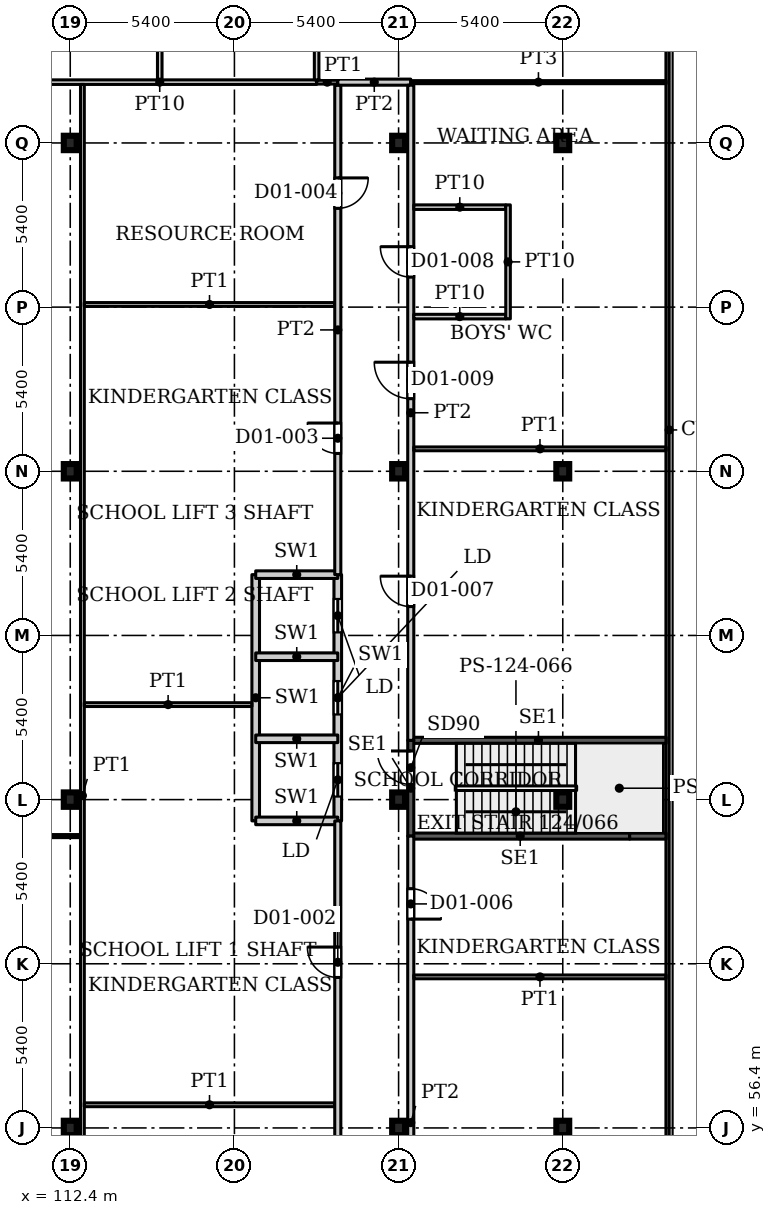
"""IFC4 building model, lengths in metres.
Left out: names, types, materials, properties, quantities, classifications, styles, units other than length and angle.
Written with IfcOpenShell. Run it as: python <this file> out.ifc"""

import sys

from ifc_helpers import new_model, si_unit, direction, frame, frame_2d, origin, origin_2d, place, context, subcontext, project, spatial, rectangle, i_section, extrude, source, transform, mapped, element, fill, save


model = new_model("IFC4")
c1 = context("Model", 3, precision=1e-05, world=origin(), true_north=direction((0.0, 1.0)))
c2 = subcontext(c1, "Body", "Model", "MODEL_VIEW")
j1 = project(units=[si_unit("LENGTHUNIT", "METRE"), si_unit("PLANEANGLEUNIT", "RADIAN")], contexts=[c1])
p1 = place(None, origin())
s1 = spatial("IfcSite", under=j1, at=p1, CompositionType="ELEMENT")
p2 = place(p1, origin())
s2 = spatial("IfcBuilding", under=s1, at=p2, CompositionType="ELEMENT")
p3 = place(p2, frame((0.0, 0.0, 7.5)))
s3 = spatial("IfcBuildingStorey", under=s2, at=p3, CompositionType="ELEMENT", Elevation=7.5)
for number, where, z_axis, x_axis in (
    (1, (112.4, 56.4, 0.0), (0.0, 0.0, 1.0), (1.0, 0.0, 0.0)),
    (2, (123.2, 56.4, 0.0), (0.0, 0.0, 1.0), (1.0, 0.0, 0.0)),
    (3, (128.6, 56.4, 0.0), (0.0, 0.0, 1.0), (1.0, 0.0, 0.0)),
    (4, (112.4, 67.2, 0.0), (0.0, 0.0, 1.0), (1.0, 0.0, 0.0)),
    (5, (123.2, 67.2, 0.0), (0.0, 0.0, 1.0), (1.0, 0.0, 0.0)),
    (6, (128.6, 67.2, 0.0), (0.0, 0.0, 1.0), (1.0, 0.0, 0.0)),
    (7, (112.4, 78.0, 0.0), (0.0, 0.0, 1.0), (1.0, 0.0, 0.0)),
    (8, (123.2, 78.0, 0.0), (0.0, 0.0, 1.0), (1.0, 0.0, 0.0)),
    (9, (128.6, 78.0, 0.0), (0.0, 0.0, 1.0), (1.0, 0.0, 0.0)),
    (10, (112.4, 88.8, 0.0), (0.0, 0.0, 1.0), (1.0, 0.0, 0.0)),
    (11, (123.2, 88.8, 0.0), (0.0, 0.0, 1.0), (1.0, 0.0, 0.0)),
    (12, (128.6, 88.8, 0.0), (0.0, 0.0, 1.0), (1.0, 0.0, 0.0)),
):
    element("IfcColumn", number, at=place(p3, frame(where, z_axis=z_axis, x_axis=x_axis)), inside=s3, PredefinedType="COLUMN", context=c2, shape_type="SweptSolid", body=[
        extrude(i_section(OverallWidth=0.424, OverallDepth=0.474, WebThickness=0.048, FlangeThickness=0.077, FilletRadius=0.014, at=origin_2d()), origin(), (0.0, 0.0, 1.0), 5.0),
    ])
p4 = place(p3, frame((118.5, 66.5, 0.0), z_axis=(0.0, 0.0, 1.0), x_axis=(0.0, 1.0, 0.0)))
e13 = element("IfcWall", 13, at=p4, inside=s3, PredefinedType="PARTITIONING", context=c2, shape_type="SweptSolid", body=[
    extrude(rectangle(XDim=8.1, YDim=0.25, at=frame_2d((4.05, 0.0))), origin(), (0.0, 0.0, 1.0), 5.0),
])
p5 = place(p3, frame((121.2, 66.5, 0.0), z_axis=(0.0, 0.0, 1.0), x_axis=(0.0, 1.0, 0.0)))
e14 = element("IfcWall", 14, at=p5, inside=s3, PredefinedType="PARTITIONING", context=c2, shape_type="SweptSolid", body=[
    extrude(rectangle(XDim=8.1, YDim=0.25, at=frame_2d((4.05, 0.0))), origin(), (0.0, 0.0, 1.0), 5.0),
])
p6 = place(p5, frame((0.8, 0.0, 0.0)))
e15 = element("IfcOpeningElement", 15, at=p6, cuts=e14, PredefinedType="OPENING", context=c2, shape_type="SweptSolid", body=[
    extrude(rectangle(XDim=1.1, YDim=2.2, at=frame_2d((0.55, 1.1))), frame((0.0, 0.135, 0.0), z_axis=(0.0, -1.0, 0.0), x_axis=(1.0, 0.0, 0.0)), (0.0, 0.0, 1.0), 0.27),
])
p7 = place(p5, frame((3.5, 0.0, 0.0)))
e16 = element("IfcOpeningElement", 16, at=p7, cuts=e14, PredefinedType="OPENING", context=c2, shape_type="SweptSolid", body=[
    extrude(rectangle(XDim=1.1, YDim=2.2, at=frame_2d((0.55, 1.1))), frame((0.0, 0.135, 0.0), z_axis=(0.0, -1.0, 0.0), x_axis=(1.0, 0.0, 0.0)), (0.0, 0.0, 1.0), 0.27),
])
p8 = place(p5, frame((6.2, 0.0, 0.0)))
e17 = element("IfcOpeningElement", 17, at=p8, cuts=e14, PredefinedType="OPENING", context=c2, shape_type="SweptSolid", body=[
    extrude(rectangle(XDim=1.1, YDim=2.2, at=frame_2d((0.55, 1.1))), frame((0.0, 0.135, 0.0), z_axis=(0.0, -1.0, 0.0), x_axis=(1.0, 0.0, 0.0)), (0.0, 0.0, 1.0), 0.27),
])
for number, where, z_axis, x_axis in (
    (18, (118.5, 66.5, 0.0), (0.0, 0.0, 1.0), (1.0, 0.0, 0.0)),
    (19, (118.5, 69.2, 0.0), (0.0, 0.0, 1.0), (1.0, 0.0, 0.0)),
    (20, (118.5, 71.9, 0.0), (0.0, 0.0, 1.0), (1.0, 0.0, 0.0)),
    (21, (118.5, 74.6, 0.0), (0.0, 0.0, 1.0), (1.0, 0.0, 0.0)),
):
    element("IfcWall", number, at=place(p3, frame(where, z_axis=z_axis, x_axis=x_axis)), inside=s3, PredefinedType="PARTITIONING", context=c2, shape_type="SweptSolid", body=[
        extrude(rectangle(XDim=2.7, YDim=0.25, at=frame_2d((1.35, 0.0))), origin(), (0.0, 0.0, 1.0), 5.0),
    ])
p9 = place(p3, frame((123.6, 66.0, 0.0), z_axis=(0.0, 0.0, 1.0), x_axis=(1.0, 0.0, 0.0)))
e22 = element("IfcWall", 22, at=p9, inside=s3, PredefinedType="SHEAR", context=c2, shape_type="SweptSolid", body=[
    extrude(rectangle(XDim=7.2, YDim=0.2, at=frame_2d((3.6, 0.0))), origin(), (0.0, 0.0, 1.0), 5.0),
])
p10 = place(p3, frame((130.8, 66.0, 0.0), z_axis=(0.0, 0.0, 1.0), x_axis=(1.0, 0.0, 0.0)))
e23 = element("IfcWall", 23, at=p10, inside=s3, PredefinedType="SHEAR", context=c2, shape_type="SweptSolid", body=[
    extrude(rectangle(XDim=1.2, YDim=0.2, at=frame_2d((0.6, 0.0))), origin(), (0.0, 0.0, 1.0), 5.0),
])
p11 = place(p3, frame((123.6, 69.15, 0.0), z_axis=(0.0, 0.0, 1.0), x_axis=(1.0, 0.0, 0.0)))
e24 = element("IfcWall", 24, at=p11, inside=s3, PredefinedType="SHEAR", context=c2, shape_type="SweptSolid", body=[
    extrude(rectangle(XDim=8.4, YDim=0.2, at=frame_2d((4.2, 0.0))), origin(), (0.0, 0.0, 1.0), 5.0),
])
p12 = place(p3, frame((123.6, 66.0, 0.0), z_axis=(0.0, 0.0, 1.0), x_axis=(0.0, 1.0, 0.0)))
e25 = element("IfcWall", 25, at=p12, inside=s3, PredefinedType="SHEAR", context=c2, shape_type="SweptSolid", body=[
    extrude(rectangle(XDim=3.15, YDim=0.2, at=frame_2d((1.575, 0.0))), origin(), (0.0, 0.0, 1.0), 5.0),
])
p13 = place(p12, frame((1.7, 0.0, 0.0)))
e26 = element("IfcOpeningElement", 26, at=p13, cuts=e25, PredefinedType="OPENING", context=c2, shape_type="SweptSolid", body=[
    extrude(rectangle(XDim=1.1, YDim=2.2, at=frame_2d((0.55, 1.1))), frame((0.0, 0.11, 0.0), z_axis=(0.0, -1.0, 0.0), x_axis=(1.0, 0.0, 0.0)), (0.0, 0.0, 1.0), 0.22),
])
p14 = place(p3, frame((92.7, 66.0, 0.0), z_axis=(0.0, 0.0, 1.0), x_axis=(1.0, 0.0, 0.0)))
e27 = element("IfcWall", 27, at=p14, inside=s3, PredefinedType="PARTITIONING", context=c2, shape_type="SweptSolid", body=[
    extrude(rectangle(XDim=20.038, YDim=0.1, at=frame_2d((10.019, 0.0))), origin(), (0.0, 0.0, 1.0), 4.68),
])
p15 = place(p3, frame((110.183, 90.8, 0.0), z_axis=(0.0, 0.0, 1.0), x_axis=(1.0, 0.0, 0.0)))
e28 = element("IfcWall", 28, at=p15, inside=s3, PredefinedType="PARTITIONING", context=c2, shape_type="SweptSolid", body=[
    extrude(rectangle(XDim=10.321, YDim=0.15, at=frame_2d((5.16, 0.0))), origin(), (0.0, 0.0, 1.0), 4.68),
])
p16 = place(p3, frame((112.8, 43.938, 0.0), z_axis=(0.0, 0.0, 1.0), x_axis=(0.0, 1.0, 0.0)))
e29 = element("IfcWall", 29, at=p16, inside=s3, PredefinedType="PARTITIONING", context=c2, shape_type="SweptSolid", body=[
    extrude(rectangle(XDim=46.787, YDim=0.125, at=frame_2d((23.394, 0.0))), origin(), (0.0, 0.0, 1.0), 4.68),
])
p17 = place(p3, frame((112.862, 57.162, 0.0), z_axis=(0.0, 0.0, 1.0), x_axis=(1.0, 0.0, 0.0)))
e30 = element("IfcWall", 30, at=p17, inside=s3, PredefinedType="PARTITIONING", context=c2, shape_type="SweptSolid", body=[
    extrude(rectangle(XDim=8.238, YDim=0.125, at=frame_2d((4.119, 0.0))), origin(), (0.0, 0.0, 1.0), 4.68),
])
p18 = place(p3, frame((112.862, 70.325, 0.0), z_axis=(0.0, 0.0, 1.0), x_axis=(1.0, 0.0, 0.0)))
e31 = element("IfcWall", 31, at=p18, inside=s3, PredefinedType="PARTITIONING", context=c2, shape_type="SweptSolid", body=[
    extrude(rectangle(XDim=5.514, YDim=0.125, at=frame_2d((2.757, 0.0))), origin(), (0.0, 0.0, 1.0), 4.68),
])
p19 = place(p3, frame((112.862, 83.487, 0.0), z_axis=(0.0, 0.0, 1.0), x_axis=(1.0, 0.0, 0.0)))
e32 = element("IfcWall", 32, at=p19, inside=s3, PredefinedType="PARTITIONING", context=c2, shape_type="SweptSolid", body=[
    extrude(rectangle(XDim=8.238, YDim=0.125, at=frame_2d((4.119, 0.0))), origin(), (0.0, 0.0, 1.0), 4.68),
])
p20 = place(p3, frame((115.344, 90.875, 0.0), z_axis=(0.0, 0.0, 1.0), x_axis=(0.0, 1.0, 0.0)))
e33 = element("IfcWall", 33, at=p20, inside=s3, PredefinedType="PARTITIONING", context=c2, shape_type="SweptSolid", body=[
    extrude(rectangle(XDim=8.225, YDim=0.15, at=frame_2d((4.113, 0.0))), origin(), (0.0, 0.0, 1.0), 4.68),
])
p21 = place(p3, frame((120.504, 90.8, 0.0), z_axis=(0.0, 0.0, 1.0), x_axis=(1.0, 0.0, 0.0)))
e34 = element("IfcWall", 34, at=p21, inside=s3, PredefinedType="PARTITIONING", context=c2, shape_type="SweptSolid", body=[
    extrude(rectangle(XDim=0.696, YDim=0.125, at=frame_2d((0.348, 0.0))), origin(), (0.0, 0.0, 1.0), 4.68),
])
p22 = place(p3, frame((120.504, 90.875, 0.0), z_axis=(0.0, 0.0, 1.0), x_axis=(0.0, 1.0, 0.0)))
e35 = element("IfcWall", 35, at=p22, inside=s3, PredefinedType="PARTITIONING", context=c2, shape_type="SweptSolid", body=[
    extrude(rectangle(XDim=8.225, YDim=0.15, at=frame_2d((4.113, 0.0))), origin(), (0.0, 0.0, 1.0), 4.68),
])
p23 = place(p3, frame((121.2, 43.9, 0.0), z_axis=(0.0, 0.0, 1.0), x_axis=(0.0, 1.0, 0.0)))
e36 = element("IfcWall", 36, at=p23, inside=s3, PredefinedType="PARTITIONING", context=c2, shape_type="SweptSolid", body=[
    extrude(rectangle(XDim=22.6, YDim=0.2, at=frame_2d((11.3, 0.0))), origin(), (0.0, 0.0, 1.0), 4.68),
])
p24 = place(p23, frame((6.112, 0.0, 0.0)))
e37 = element("IfcOpeningElement", 37, at=p24, cuts=e36, PredefinedType="OPENING", context=c2, shape_type="SweptSolid", body=[
    extrude(rectangle(XDim=1.0, YDim=2.1, at=frame_2d((0.5, 1.05))), frame((0.0, 0.11, 0.0), z_axis=(0.0, -1.0, 0.0), x_axis=(1.0, 0.0, 0.0)), (0.0, 0.0, 1.0), 0.22),
])
p25 = place(p23, frame((17.45, 0.0, 0.0)))
e38 = element("IfcOpeningElement", 38, at=p25, cuts=e36, PredefinedType="OPENING", context=c2, shape_type="SweptSolid", body=[
    extrude(rectangle(XDim=1.0, YDim=2.1, at=frame_2d((0.5, 1.05))), frame((0.0, 0.11, 0.0), z_axis=(0.0, -1.0, 0.0), x_axis=(1.0, 0.0, 0.0)), (0.0, 0.0, 1.0), 0.22),
])
p26 = place(p3, frame((121.2, 74.6, 0.0), z_axis=(0.0, 0.0, 1.0), x_axis=(0.0, 1.0, 0.0)))
e39 = element("IfcWall", 39, at=p26, inside=s3, PredefinedType="PARTITIONING", context=c2, shape_type="SweptSolid", body=[
    extrude(rectangle(XDim=16.1, YDim=0.2, at=frame_2d((8.05, 0.0))), origin(), (0.0, 0.0, 1.0), 4.68),
])
p27 = place(p26, frame((3.987, 0.0, 0.0)))
e40 = element("IfcOpeningElement", 40, at=p27, cuts=e39, PredefinedType="OPENING", context=c2, shape_type="SweptSolid", body=[
    extrude(rectangle(XDim=1.0, YDim=2.1, at=frame_2d((0.5, 1.05))), frame((0.0, 0.11, 0.0), z_axis=(0.0, -1.0, 0.0), x_axis=(1.0, 0.0, 0.0)), (0.0, 0.0, 1.0), 0.22),
])
p28 = place(p26, frame((12.05, 0.0, 0.0)))
e41 = element("IfcOpeningElement", 41, at=p28, cuts=e39, PredefinedType="OPENING", context=c2, shape_type="SweptSolid", body=[
    extrude(rectangle(XDim=1.0, YDim=2.1, at=frame_2d((0.5, 1.05))), frame((0.0, 0.11, 0.0), z_axis=(0.0, -1.0, 0.0), x_axis=(1.0, 0.0, 0.0)), (0.0, 0.0, 1.0), 0.22),
])
p29 = place(p3, frame((121.2, 90.8, 0.0), z_axis=(0.0, 0.0, 1.0), x_axis=(1.0, 0.0, 0.0)))
e42 = element("IfcWall", 42, at=p29, inside=s3, PredefinedType="PARTITIONING", context=c2, shape_type="SweptSolid", body=[
    extrude(rectangle(XDim=2.4, YDim=0.2, at=frame_2d((1.2, 0.0))), origin(), (0.0, 0.0, 1.0), 4.68),
])
p30 = place(p3, frame((123.6, 47.15, 0.0), z_axis=(0.0, 0.0, 1.0), x_axis=(0.0, 1.0, 0.0)))
e43 = element("IfcWall", 43, at=p30, inside=s3, PredefinedType="PARTITIONING", context=c2, shape_type="SweptSolid", body=[
    extrude(rectangle(XDim=18.85, YDim=0.2, at=frame_2d((9.425, 0.0))), origin(), (0.0, 0.0, 1.0), 4.68),
])
p31 = place(p30, frame((6.65, 0.0, 0.0)))
e44 = element("IfcOpeningElement", 44, at=p31, cuts=e43, PredefinedType="OPENING", context=c2, shape_type="SweptSolid", body=[
    extrude(rectangle(XDim=1.0, YDim=2.1, at=frame_2d((0.5, 1.05))), frame((0.0, 0.11, 0.0), z_axis=(0.0, -1.0, 0.0), x_axis=(1.0, 0.0, 0.0)), (0.0, 0.0, 1.0), 0.22),
])
p32 = place(p30, frame((16.119, 0.0, 0.0)))
e45 = element("IfcOpeningElement", 45, at=p32, cuts=e43, PredefinedType="OPENING", context=c2, shape_type="SweptSolid", body=[
    extrude(rectangle(XDim=1.0, YDim=2.1, at=frame_2d((0.5, 1.05))), frame((0.0, 0.11, 0.0), z_axis=(0.0, -1.0, 0.0), x_axis=(1.0, 0.0, 0.0)), (0.0, 0.0, 1.0), 0.22),
])
p33 = place(p3, frame((123.6, 69.15, 0.0), z_axis=(0.0, 0.0, 1.0), x_axis=(0.0, 1.0, 0.0)))
e46 = element("IfcWall", 46, at=p33, inside=s3, PredefinedType="PARTITIONING", context=c2, shape_type="SweptSolid", body=[
    extrude(rectangle(XDim=21.55, YDim=0.2, at=frame_2d((10.775, 0.0))), origin(), (0.0, 0.0, 1.0), 4.68),
])
p34 = place(p33, frame((4.4, 0.0, 0.0)))
e47 = element("IfcOpeningElement", 47, at=p34, cuts=e46, PredefinedType="OPENING", context=c2, shape_type="SweptSolid", body=[
    extrude(rectangle(XDim=1.0, YDim=2.1, at=frame_2d((0.5, 1.05))), frame((0.0, 0.11, 0.0), z_axis=(0.0, -1.0, 0.0), x_axis=(1.0, 0.0, 0.0)), (0.0, 0.0, 1.0), 0.22),
])
p35 = place(p33, frame((15.238, 0.0, 0.0)))
e48 = element("IfcOpeningElement", 48, at=p35, cuts=e46, PredefinedType="OPENING", context=c2, shape_type="SweptSolid", body=[
    extrude(rectangle(XDim=1.0, YDim=2.1, at=frame_2d((0.5, 1.05))), frame((0.0, 0.11, 0.0), z_axis=(0.0, -1.0, 0.0), x_axis=(1.0, 0.0, 0.0)), (0.0, 0.0, 1.0), 0.22),
])
p36 = place(p33, frame((11.238, 0.0, 0.0)))
e49 = element("IfcOpeningElement", 49, at=p36, cuts=e46, PredefinedType="OPENING", context=c2, shape_type="SweptSolid", body=[
    extrude(rectangle(XDim=1.2, YDim=2.1, at=frame_2d((0.6, 1.05))), frame((0.0, 0.11, 0.0), z_axis=(0.0, -1.0, 0.0), x_axis=(1.0, 0.0, 0.0)), (0.0, 0.0, 1.0), 0.22),
])
p37 = place(p3, frame((123.6, 90.8, 0.0), z_axis=(0.0, 0.0, 1.0), x_axis=(1.0, 0.0, 0.0)))
e50 = element("IfcWall", 50, at=p37, inside=s3, PredefinedType="PARTITIONING", context=c2, shape_type="SweptSolid", body=[
    extrude(rectangle(XDim=8.4, YDim=0.1, at=frame_2d((4.2, 0.0))), origin(), (0.0, 0.0, 1.0), 4.68),
])
for number, where, z_axis, x_axis in (
    (51, (123.7, 61.369, 0.0), (0.0, 0.0, 1.0), (1.0, 0.0, 0.0)),
    (52, (123.7, 78.738, 0.0), (0.0, 0.0, 1.0), (1.0, 0.0, 0.0)),
):
    element("IfcWall", number, at=place(p3, frame(where, z_axis=z_axis, x_axis=x_axis)), inside=s3, PredefinedType="PARTITIONING", context=c2, shape_type="SweptSolid", body=[
        extrude(rectangle(XDim=8.3, YDim=0.125, at=frame_2d((4.15, 0.0))), origin(), (0.0, 0.0, 1.0), 4.68),
    ])
for number, where, z_axis, x_axis in (
    (53, (123.7, 83.088, 0.0), (0.0, 0.0, 1.0), (1.0, 0.0, 0.0)),
    (54, (123.7, 86.688, 0.0), (0.0, 0.0, 1.0), (1.0, 0.0, 0.0)),
):
    element("IfcWall", number, at=place(p3, frame(where, z_axis=z_axis, x_axis=x_axis)), inside=s3, PredefinedType="PARTITIONING", context=c2, shape_type="SweptSolid", body=[
        extrude(rectangle(XDim=3.025, YDim=0.15, at=frame_2d((1.513, 0.0))), origin(), (0.0, 0.0, 1.0), 4.68),
    ])
p38 = place(p3, frame((126.8, 83.013, 0.0), z_axis=(0.0, 0.0, 1.0), x_axis=(0.0, 1.0, 0.0)))
e55 = element("IfcWall", 55, at=p38, inside=s3, PredefinedType="PARTITIONING", context=c2, shape_type="SweptSolid", body=[
    extrude(rectangle(XDim=3.75, YDim=0.15, at=frame_2d((1.875, 0.0))), origin(), (0.0, 0.0, 1.0), 4.68),
])
m1 = source(origin(), c2, "Body", "SweptSolid", [
    extrude(rectangle(XDim=1.1, YDim=2.2, at=frame_2d((0.55, 1.1))), frame((0.0, 0.025, 0.0), z_axis=(0.0, -1.0, 0.0), x_axis=(1.0, 0.0, 0.0)), (0.0, 0.0, 1.0), 0.05),
])
p39 = place(p6, origin())
e56 = element("IfcDoor", 56, at=p39, inside=s3, OperationType="SLIDING_TO_LEFT", PredefinedType="DOOR", context=c2, shape_type="MappedRepresentation", body=[
    mapped(m1, transform((0.0, 0.0, 0.0), x_axis=(1.0, 0.0, 0.0), y_axis=(0.0, 1.0, 0.0), z_axis=(0.0, 0.0, 1.0), scale=1.0)),
])
fill(e15, e56)
p40 = place(p7, origin())
e57 = element("IfcDoor", 57, at=p40, inside=s3, OperationType="SLIDING_TO_LEFT", PredefinedType="DOOR", context=c2, shape_type="MappedRepresentation", body=[
    mapped(m1, transform((0.0, 0.0, 0.0), x_axis=(1.0, 0.0, 0.0), y_axis=(0.0, 1.0, 0.0), z_axis=(0.0, 0.0, 1.0), scale=1.0)),
])
fill(e16, e57)
p41 = place(p8, origin())
e58 = element("IfcDoor", 58, at=p41, inside=s3, OperationType="SLIDING_TO_LEFT", PredefinedType="DOOR", context=c2, shape_type="MappedRepresentation", body=[
    mapped(m1, transform((0.0, 0.0, 0.0), x_axis=(1.0, 0.0, 0.0), y_axis=(0.0, 1.0, 0.0), z_axis=(0.0, 0.0, 1.0), scale=1.0)),
])
fill(e17, e58)
m2 = source(origin(), c2, "Body", "SweptSolid", [
    extrude(rectangle(XDim=1.1, YDim=2.2, at=frame_2d((0.55, 1.1))), frame((0.0, 0.025, 0.0), z_axis=(0.0, -1.0, 0.0), x_axis=(1.0, 0.0, 0.0)), (0.0, 0.0, 1.0), 0.05),
])
p42 = place(p13, origin())
e59 = element("IfcDoor", 59, at=p42, inside=s3, OperationType="SINGLE_SWING_LEFT", PredefinedType="DOOR", context=c2, shape_type="MappedRepresentation", body=[
    mapped(m2, transform((0.0, 0.0, 0.0), x_axis=(1.0, 0.0, 0.0), y_axis=(0.0, 1.0, 0.0), z_axis=(0.0, 0.0, 1.0), scale=1.0)),
])
fill(e26, e59)
m3 = source(origin(), c2, "Body", "SweptSolid", [
    extrude(rectangle(XDim=1.0, YDim=2.1, at=frame_2d((0.5, 1.05))), frame((0.0, 0.025, 0.0), z_axis=(0.0, -1.0, 0.0), x_axis=(1.0, 0.0, 0.0)), (0.0, 0.0, 1.0), 0.05),
])
p43 = place(p25, origin())
e60 = element("IfcDoor", 60, at=p43, inside=s3, OperationType="SINGLE_SWING_LEFT", PredefinedType="DOOR", context=c2, shape_type="MappedRepresentation", body=[
    mapped(m3, transform((0.0, 0.0, 0.0), x_axis=(1.0, 0.0, 0.0), y_axis=(0.0, 1.0, 0.0), z_axis=(0.0, 0.0, 1.0), scale=1.0)),
])
fill(e38, e60)
p44 = place(p27, origin())
e61 = element("IfcDoor", 61, at=p44, inside=s3, OperationType="SINGLE_SWING_LEFT", PredefinedType="DOOR", context=c2, shape_type="MappedRepresentation", body=[
    mapped(m3, transform((0.0, 0.0, 0.0), x_axis=(1.0, 0.0, 0.0), y_axis=(0.0, 1.0, 0.0), z_axis=(0.0, 0.0, 1.0), scale=1.0)),
])
fill(e40, e61)
p45 = place(p28, origin())
e62 = element("IfcDoor", 62, at=p45, inside=s3, OperationType="SINGLE_SWING_RIGHT", PredefinedType="DOOR", context=c2, shape_type="MappedRepresentation", body=[
    mapped(m3, transform((0.0, 0.0, 0.0), x_axis=(1.0, 0.0, 0.0), y_axis=(0.0, 1.0, 0.0), z_axis=(0.0, 0.0, 1.0), scale=1.0)),
])
fill(e41, e62)
p46 = place(p32, origin())
e63 = element("IfcDoor", 63, at=p46, inside=s3, OperationType="SINGLE_SWING_RIGHT", PredefinedType="DOOR", context=c2, shape_type="MappedRepresentation", body=[
    mapped(m3, transform((0.0, 0.0, 0.0), x_axis=(1.0, 0.0, 0.0), y_axis=(0.0, 1.0, 0.0), z_axis=(0.0, 0.0, 1.0), scale=1.0)),
])
fill(e45, e63)
p47 = place(p34, origin())
e64 = element("IfcDoor", 64, at=p47, inside=s3, OperationType="SINGLE_SWING_LEFT", PredefinedType="DOOR", context=c2, shape_type="MappedRepresentation", body=[
    mapped(m3, transform((0.0, 0.0, 0.0), x_axis=(1.0, 0.0, 0.0), y_axis=(0.0, 1.0, 0.0), z_axis=(0.0, 0.0, 1.0), scale=1.0)),
])
fill(e47, e64)
p48 = place(p35, origin())
e65 = element("IfcDoor", 65, at=p48, inside=s3, OperationType="SINGLE_SWING_LEFT", PredefinedType="DOOR", context=c2, shape_type="MappedRepresentation", body=[
    mapped(m3, transform((0.0, 0.0, 0.0), x_axis=(1.0, 0.0, 0.0), y_axis=(0.0, 1.0, 0.0), z_axis=(0.0, 0.0, 1.0), scale=1.0)),
])
fill(e48, e65)
m4 = source(origin(), c2, "Body", "SweptSolid", [
    extrude(rectangle(XDim=1.2, YDim=2.1, at=frame_2d((0.6, 1.05))), frame((0.0, 0.025, 0.0), z_axis=(0.0, -1.0, 0.0), x_axis=(1.0, 0.0, 0.0)), (0.0, 0.0, 1.0), 0.05),
])
p49 = place(p36, origin())
e66 = element("IfcDoor", 66, at=p49, inside=s3, OperationType="SINGLE_SWING_LEFT", PredefinedType="DOOR", context=c2, shape_type="MappedRepresentation", body=[
    mapped(m4, transform((0.0, 0.0, 0.0), x_axis=(1.0, 0.0, 0.0), y_axis=(0.0, 1.0, 0.0), z_axis=(0.0, 0.0, 1.0), scale=1.0)),
])
fill(e49, e66)
save(model, sys.argv[1])
